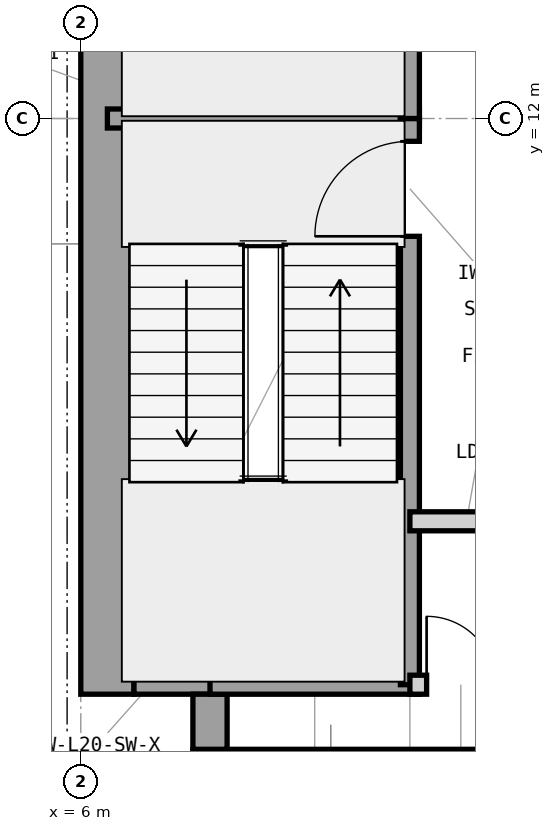
"""IFC4 building model, lengths in metres.
Left out: names, types, materials, properties, quantities, classifications, styles, units other than length and angle.
Written with IfcOpenShell. Run it as: python <this file> out.ifc"""

import sys

from ifc_helpers import new_model, si_unit, direction, frame, frame_2d, origin, place, context, subcontext, project, spatial, rectangle, extrude, element, fill, save


model = new_model("IFC4")
c1 = context("Model", 3, precision=1e-05, world=origin(), true_north=direction((0.0, 1.0)))
c2 = subcontext(c1, "Body", "Model", "MODEL_VIEW")
j1 = project(units=[si_unit("LENGTHUNIT", "METRE"), si_unit("PLANEANGLEUNIT", "RADIAN")], contexts=[c1])
p1 = place(None, origin())
s1 = spatial("IfcSite", under=j1, at=p1, CompositionType="ELEMENT")
p2 = place(p1, origin())
s2 = spatial("IfcBuilding", under=s1, at=p2, CompositionType="ELEMENT")
p3 = place(p2, frame((0.0, 0.0, 89.1)))
s3 = spatial("IfcBuildingStorey", under=s2, at=p3, CompositionType="ELEMENT", Elevation=89.1)
p4 = place(p3, frame((7.475, 3.35, 0.0), z_axis=(0.0, 0.0, 1.0), x_axis=(1.0, 0.0, 0.0)))
e1 = element("IfcWall", 1, at=p4, inside=s3, PredefinedType="SHEAR", context=c2, shape_type="SweptSolid", body=[
    extrude(rectangle(XDim=16.525, YDim=0.7, at=frame_2d((8.262, 0.0))), origin(), (0.0, 0.0, 1.0), 4.2),
])
p5 = place(p3, frame((6.35, 4.425, 0.0), z_axis=(0.0, 0.0, 1.0), x_axis=(0.0, 1.0, 0.0)))
e2 = element("IfcWall", 2, at=p5, inside=s3, PredefinedType="SHEAR", context=c2, shape_type="SweptSolid", body=[
    extrude(rectangle(XDim=15.15, YDim=0.7, at=frame_2d((7.575, 0.0))), origin(), (0.0, 0.0, 1.0), 4.2),
])
p6 = place(p3, frame((6.7, 4.65, 0.0), z_axis=(0.0, 0.0, 1.0), x_axis=(1.0, 0.0, 0.0)))
e3 = element("IfcWall", 3, at=p6, inside=s3, PredefinedType="SHEAR", context=c2, shape_type="SweptSolid", body=[
    extrude(rectangle(XDim=1.225, YDim=0.45, at=frame_2d((0.613, 0.0))), origin(), (0.0, 0.0, 1.0), 4.2),
])
p7 = place(p3, frame((7.7, 3.7, 0.0), z_axis=(0.0, 0.0, 1.0), x_axis=(0.0, 1.0, 0.0)))
e4 = element("IfcWall", 4, at=p7, inside=s3, PredefinedType="SHEAR", context=c2, shape_type="SweptSolid", body=[
    extrude(rectangle(XDim=0.725, YDim=0.45, at=frame_2d((0.363, 0.0))), origin(), (0.0, 0.0, 1.0), 4.2),
])
p8 = place(p3, frame((6.35, 12.0, 0.0), z_axis=(0.0, 0.0, 1.0), x_axis=(1.0, 0.0, 0.0)))
e5 = element("IfcWall", 5, at=p8, inside=s3, PredefinedType="SHEAR", context=c2, shape_type="SweptSolid", body=[
    extrude(rectangle(XDim=4.105, YDim=0.25, at=frame_2d((2.052, 0.0))), origin(), (0.0, 0.0, 1.0), 4.2),
])
p9 = place(p3, frame((7.7, 4.55, 0.0), z_axis=(0.0, 0.0, 1.0), x_axis=(1.0, 0.0, 0.0)))
e6 = element("IfcWall", 6, at=p9, inside=s3, PredefinedType="SHEAR", context=c2, shape_type="SweptSolid", body=[
    extrude(rectangle(XDim=2.755, YDim=0.25, at=frame_2d((1.377, 0.0))), origin(), (0.0, 0.0, 1.0), 4.2),
])
p10 = place(p3, frame((10.33, 4.55, 0.0), z_axis=(0.0, 0.0, 1.0), x_axis=(0.0, 1.0, 0.0)))
e7 = element("IfcWall", 7, at=p10, inside=s3, PredefinedType="SHEAR", context=c2, shape_type="SweptSolid", body=[
    extrude(rectangle(XDim=7.45, YDim=0.25, at=frame_2d((3.725, 0.0))), origin(), (0.0, 0.0, 1.0), 4.2),
])
p11 = place(p10, frame((5.9, 0.0, 0.0)))
e8 = element("IfcOpeningElement", 8, at=p11, cuts=e7, PredefinedType="OPENING", context=c2, shape_type="SweptSolid", body=[
    extrude(rectangle(XDim=1.25, YDim=2.2, at=frame_2d((0.625, 1.1))), frame((0.0, 0.135, 0.0), z_axis=(0.0, -1.0, 0.0), x_axis=(1.0, 0.0, 0.0)), (0.0, 0.0, 1.0), 0.27),
])
p12 = place(p3, frame((10.33, 12.0, 0.0), z_axis=(0.0, 0.0, 1.0), x_axis=(0.0, 1.0, 0.0)))
e9 = element("IfcWall", 9, at=p12, inside=s3, PredefinedType="SHEAR", context=c2, shape_type="SweptSolid", body=[
    extrude(rectangle(XDim=7.45, YDim=0.25, at=frame_2d((3.725, 0.0))), origin(), (0.0, 0.0, 1.0), 4.2),
])
p13 = place(p12, frame((5.85, 0.0, 0.0)))
e10 = element("IfcOpeningElement", 10, at=p13, cuts=e9, PredefinedType="OPENING", context=c2, shape_type="SweptSolid", body=[
    extrude(rectangle(XDim=1.25, YDim=2.2, at=frame_2d((0.625, 1.1))), frame((0.0, 0.135, 0.0), z_axis=(0.0, -1.0, 0.0), x_axis=(1.0, 0.0, 0.0)), (0.0, 0.0, 1.0), 0.27),
])
p14 = place(p3, frame((10.33, 4.55, 0.0), z_axis=(0.0, 0.0, 1.0), x_axis=(1.0, 0.0, 0.0)))
e11 = element("IfcWall", 11, at=p14, inside=s3, PredefinedType="PARTITIONING", context=c2, shape_type="SweptSolid", body=[
    extrude(rectangle(XDim=1.49, YDim=0.25, at=frame_2d((0.745, 0.0))), origin(), (0.0, 0.0, 1.0), 3.93),
])
p15 = place(p14, frame((0.22, 0.0, 0.0)))
e12 = element("IfcOpeningElement", 12, at=p15, cuts=e11, PredefinedType="OPENING", context=c2, shape_type="SweptSolid", body=[
    extrude(rectangle(XDim=0.9, YDim=2.1, at=frame_2d((0.45, 1.05))), frame((0.0, 0.135, 0.0), z_axis=(0.0, -1.0, 0.0), x_axis=(1.0, 0.0, 0.0)), (0.0, 0.0, 1.0), 0.27),
])
p16 = place(p3, frame((10.33, 6.7, 0.0), z_axis=(0.0, 0.0, 1.0), x_axis=(1.0, 0.0, 0.0)))
e13 = element("IfcWall", 13, at=p16, inside=s3, PredefinedType="PARTITIONING", context=c2, shape_type="SweptSolid", body=[
    extrude(rectangle(XDim=1.49, YDim=0.25, at=frame_2d((0.745, 0.0))), origin(), (0.0, 0.0, 1.0), 3.527),
])
p17 = place(p11, origin())
e14 = element("IfcDoor", 14, at=p17, inside=s3, OperationType="SINGLE_SWING_LEFT", PredefinedType="DOOR", context=c2, shape_type="SweptSolid", body=[
    extrude(rectangle(XDim=1.25, YDim=2.2, at=frame_2d((0.625, 1.1))), frame((0.0, 0.025, 0.0), z_axis=(0.0, -1.0, 0.0), x_axis=(1.0, 0.0, 0.0)), (0.0, 0.0, 1.0), 0.05),
])
fill(e8, e14)
p18 = place(p15, origin())
e15 = element("IfcDoor", 15, at=p18, inside=s3, OperationType="SINGLE_SWING_LEFT", PredefinedType="TRAPDOOR", context=c2, shape_type="SweptSolid", body=[
    extrude(rectangle(XDim=0.9, YDim=2.1, at=frame_2d((0.45, 1.05))), frame((0.0, 0.025, 0.0), z_axis=(0.0, -1.0, 0.0), x_axis=(1.0, 0.0, 0.0)), (0.0, 0.0, 1.0), 0.05),
])
fill(e12, e15)
save(model, sys.argv[1])
